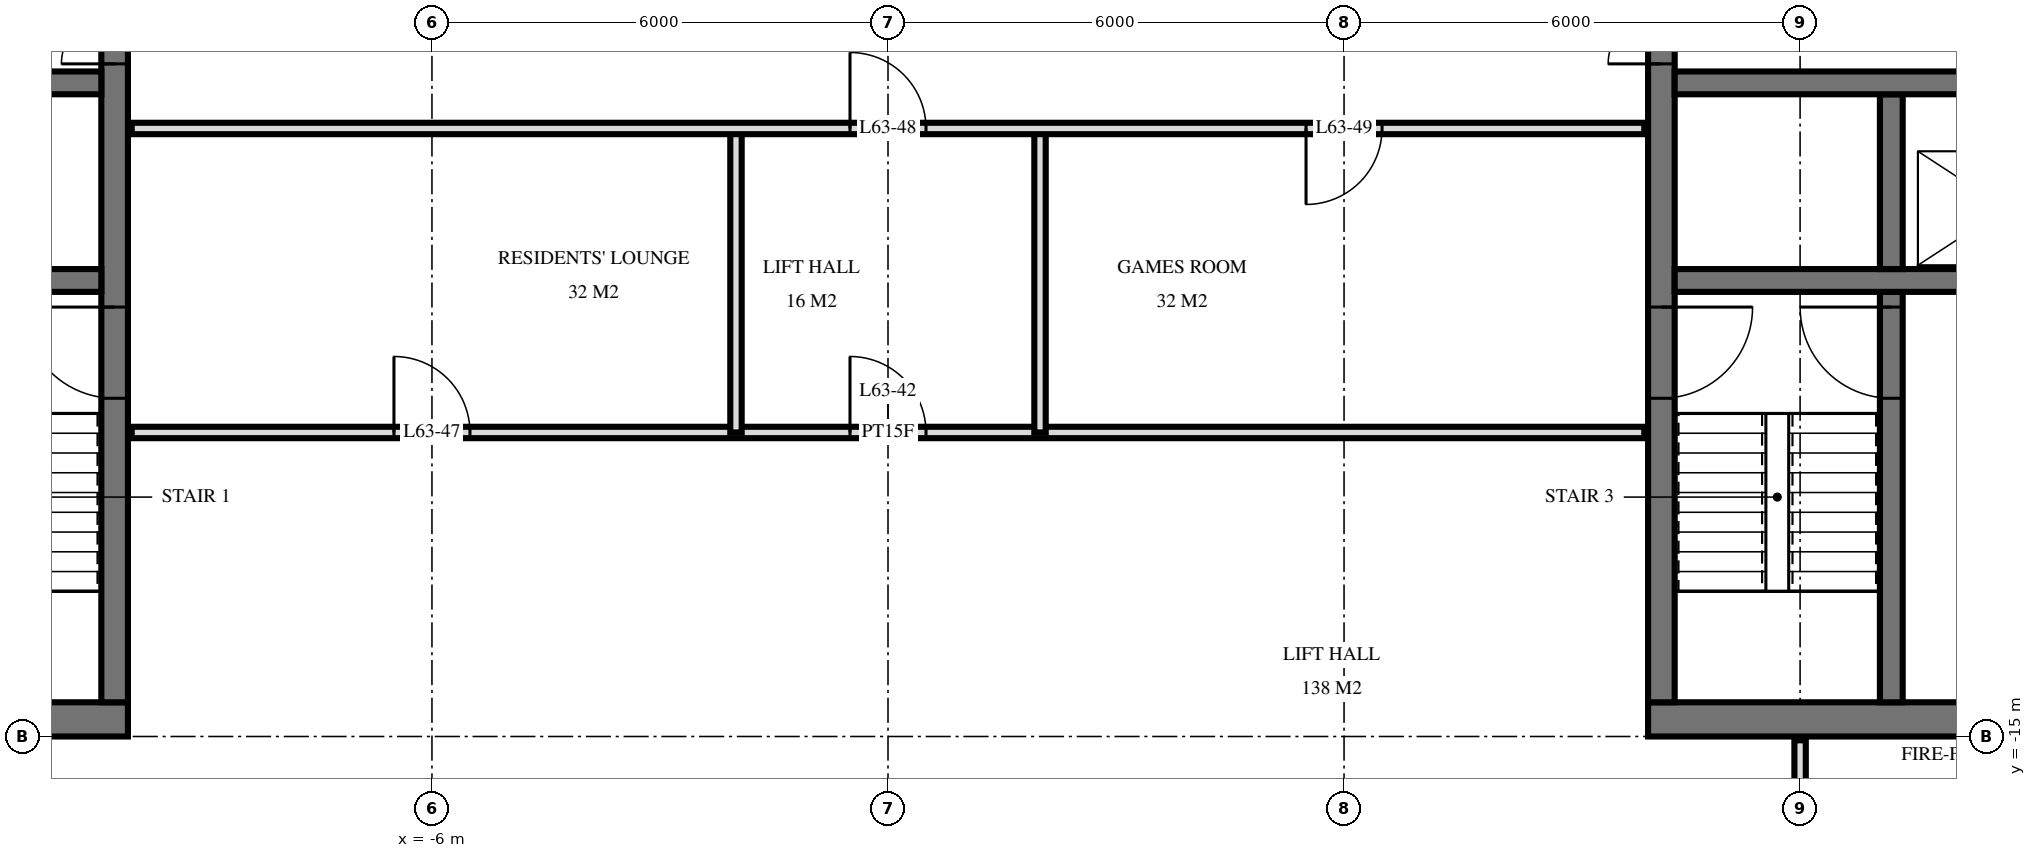
"""IFC4 building model, lengths in metres.
Left out: names, types, materials, properties, quantities, classifications, styles, units other than length and angle.
Written with IfcOpenShell. Run it as: python <this file> out.ifc"""

import sys

from ifc_helpers import new_model, si_unit, direction, frame, frame_2d, origin, place, context, subcontext, project, spatial, rectangle, extrude, element, fill, save


model = new_model("IFC4")
c1 = context("Model", 3, precision=1e-05, world=origin(), true_north=direction((0.0, 1.0)))
c2 = subcontext(c1, "Body", "Model", "MODEL_VIEW")
j1 = project(units=[si_unit("LENGTHUNIT", "METRE"), si_unit("PLANEANGLEUNIT", "RADIAN")], contexts=[c1])
p1 = place(None, origin())
s1 = spatial("IfcSite", under=j1, at=p1, CompositionType="ELEMENT")
p2 = place(p1, origin())
s2 = spatial("IfcBuilding", under=s1, at=p2, CompositionType="ELEMENT")
p3 = place(p2, frame((0.0, 0.0, 239.6)))
s3 = spatial("IfcBuildingStorey", under=s2, at=p3, CompositionType="ELEMENT", Elevation=239.6)
p4 = place(p3, frame((-24.5, -14.775, 0.0), z_axis=(0.0, 0.0, 1.0), x_axis=(1.0, 0.0, 0.0)))
e1 = element("IfcWall", 1, at=p4, inside=s3, PredefinedType="SHEAR", context=c2, shape_type="SweptSolid", body=[
    extrude(rectangle(XDim=14.5, YDim=0.45, at=frame_2d((7.25, 0.0))), origin(), (0.0, 0.0, 1.0), 3.5),
])
p5 = place(p4, frame((6.2, 0.0, 0.0)))
e2 = element("IfcOpeningElement", 2, at=p5, cuts=e1, PredefinedType="OPENING", context=c2, shape_type="SweptSolid", body=[
    extrude(rectangle(XDim=1.2, YDim=2.1, at=frame_2d((0.6, 1.05))), frame((0.0, 0.235, 0.0), z_axis=(0.0, -1.0, 0.0), x_axis=(1.0, 0.0, 0.0)), (0.0, 0.0, 1.0), 0.47),
])
p6 = place(p4, frame((9.25, 0.0, 0.0)))
e3 = element("IfcOpeningElement", 3, at=p6, cuts=e1, PredefinedType="OPENING", context=c2, shape_type="SweptSolid", body=[
    extrude(rectangle(XDim=1.1, YDim=2.1, at=frame_2d((0.55, 1.05))), frame((0.0, 0.235, 0.0), z_axis=(0.0, -1.0, 0.0), x_axis=(1.0, 0.0, 0.0)), (0.0, 0.0, 1.0), 0.47),
])
p7 = place(p4, frame((3.5, 0.0, 0.0)))
e4 = element("IfcOpeningElement", 4, at=p7, cuts=e1, PredefinedType="OPENING", context=c2, shape_type="SweptSolid", body=[
    extrude(rectangle(XDim=0.9, YDim=2.1, at=frame_2d((0.45, 1.05))), frame((0.0, 0.235, 0.0), z_axis=(0.0, -1.0, 0.0), x_axis=(1.0, 0.0, 0.0)), (0.0, 0.0, 1.0), 0.47),
])
p8 = place(p4, frame((1.05, 0.0, 0.0)))
e5 = element("IfcOpeningElement", 5, at=p8, cuts=e1, PredefinedType="OPENING", context=c2, shape_type="SweptSolid", body=[
    extrude(rectangle(XDim=1.0, YDim=2.1, at=frame_2d((0.5, 1.05))), frame((0.0, 0.235, 0.0), z_axis=(0.0, -1.0, 0.0), x_axis=(1.0, 0.0, 0.0)), (0.0, 0.0, 1.0), 0.47),
])
p9 = place(p3, frame((-10.175, -14.55, 0.0), z_axis=(0.0, 0.0, 1.0), x_axis=(0.0, 1.0, 0.0)))
e6 = element("IfcWall", 6, at=p9, inside=s3, PredefinedType="SHEAR", context=c2, shape_type="SweptSolid", body=[
    extrude(rectangle(XDim=14.1, YDim=0.35, at=frame_2d((7.05, 0.0))), origin(), (0.0, 0.0, 1.0), 3.5),
])
p10 = place(p9, frame((8.4, 0.0, 0.0)))
e7 = element("IfcOpeningElement", 7, at=p10, cuts=e6, PredefinedType="OPENING", context=c2, shape_type="SweptSolid", body=[
    extrude(rectangle(XDim=1.4, YDim=2.4, at=frame_2d((0.7, 1.2))), frame((0.0, 0.185, 0.0), z_axis=(0.0, -1.0, 0.0), x_axis=(1.0, 0.0, 0.0)), (0.0, 0.0, 1.0), 0.37),
])
p11 = place(p9, frame((10.0, 0.0, 0.0)))
e8 = element("IfcOpeningElement", 8, at=p11, cuts=e6, PredefinedType="OPENING", context=c2, shape_type="SweptSolid", body=[
    extrude(rectangle(XDim=1.4, YDim=2.4, at=frame_2d((0.7, 1.2))), frame((0.0, 0.185, 0.0), z_axis=(0.0, -1.0, 0.0), x_axis=(1.0, 0.0, 0.0)), (0.0, 0.0, 1.0), 0.37),
])
p12 = place(p9, frame((4.0, 0.0, 0.0)))
e9 = element("IfcOpeningElement", 9, at=p12, cuts=e6, PredefinedType="OPENING", context=c2, shape_type="SweptSolid", body=[
    extrude(rectangle(XDim=1.2, YDim=2.1, at=frame_2d((0.6, 1.05))), frame((0.0, 0.185, 0.0), z_axis=(0.0, -1.0, 0.0), x_axis=(1.0, 0.0, 0.0)), (0.0, 0.0, 1.0), 0.37),
])
p13 = place(p3, frame((-24.05, -6.4, 0.0), z_axis=(0.0, 0.0, 1.0), x_axis=(1.0, 0.0, 0.0)))
e10 = element("IfcWall", 10, at=p13, inside=s3, PredefinedType="SHEAR", context=c2, shape_type="SweptSolid", body=[
    extrude(rectangle(XDim=13.7, YDim=0.3, at=frame_2d((6.85, 0.0))), origin(), (0.0, 0.0, 1.0), 3.5),
])
p14 = place(p13, frame((0.55, 0.0, 0.0)))
e11 = element("IfcOpeningElement", 11, at=p14, cuts=e10, PredefinedType="OPENING", context=c2, shape_type="SweptSolid", body=[
    extrude(rectangle(XDim=1.1, YDim=2.1, at=frame_2d((0.55, 1.05))), frame((0.0, 0.16, 0.0), z_axis=(0.0, -1.0, 0.0), x_axis=(1.0, 0.0, 0.0)), (0.0, 0.0, 1.0), 0.32),
])
p15 = place(p13, frame((5.8, 0.0, 0.0)))
e12 = element("IfcOpeningElement", 12, at=p15, cuts=e10, PredefinedType="OPENING", context=c2, shape_type="SweptSolid", body=[
    extrude(rectangle(XDim=1.1, YDim=2.1, at=frame_2d((0.55, 1.05))), frame((0.0, 0.16, 0.0), z_axis=(0.0, -1.0, 0.0), x_axis=(1.0, 0.0, 0.0)), (0.0, 0.0, 1.0), 0.32),
])
p16 = place(p3, frame((-24.05, -9.0, 0.0), z_axis=(0.0, 0.0, 1.0), x_axis=(1.0, 0.0, 0.0)))
e13 = element("IfcWall", 13, at=p16, inside=s3, PredefinedType="SHEAR", context=c2, shape_type="SweptSolid", body=[
    extrude(rectangle(XDim=13.7, YDim=0.3, at=frame_2d((6.85, 0.0))), origin(), (0.0, 0.0, 1.0), 3.5),
])
p17 = place(p16, frame((8.8, 0.0, 0.0)))
e14 = element("IfcOpeningElement", 14, at=p17, cuts=e13, PredefinedType="OPENING", context=c2, shape_type="SweptSolid", body=[
    extrude(rectangle(XDim=1.1, YDim=2.1, at=frame_2d((0.55, 1.05))), frame((0.0, 0.16, 0.0), z_axis=(0.0, -1.0, 0.0), x_axis=(1.0, 0.0, 0.0)), (0.0, 0.0, 1.0), 0.32),
])
p18 = place(p3, frame((10.0, -14.775, 0.0), z_axis=(0.0, 0.0, 1.0), x_axis=(1.0, 0.0, 0.0)))
e15 = element("IfcWall", 15, at=p18, inside=s3, PredefinedType="SHEAR", context=c2, shape_type="SweptSolid", body=[
    extrude(rectangle(XDim=14.5, YDim=0.45, at=frame_2d((7.25, 0.0))), origin(), (0.0, 0.0, 1.0), 3.5),
])
p19 = place(p18, frame((7.1, 0.0, 0.0)))
e16 = element("IfcOpeningElement", 16, at=p19, cuts=e15, PredefinedType="OPENING", context=c2, shape_type="SweptSolid", body=[
    extrude(rectangle(XDim=1.2, YDim=2.1, at=frame_2d((0.6, 1.05))), frame((0.0, 0.235, 0.0), z_axis=(0.0, -1.0, 0.0), x_axis=(1.0, 0.0, 0.0)), (0.0, 0.0, 1.0), 0.47),
])
p20 = place(p18, frame((4.15, 0.0, 0.0)))
e17 = element("IfcOpeningElement", 17, at=p20, cuts=e15, PredefinedType="OPENING", context=c2, shape_type="SweptSolid", body=[
    extrude(rectangle(XDim=1.1, YDim=2.1, at=frame_2d((0.55, 1.05))), frame((0.0, 0.235, 0.0), z_axis=(0.0, -1.0, 0.0), x_axis=(1.0, 0.0, 0.0)), (0.0, 0.0, 1.0), 0.47),
])
p21 = place(p18, frame((10.1, 0.0, 0.0)))
e18 = element("IfcOpeningElement", 18, at=p21, cuts=e15, PredefinedType="OPENING", context=c2, shape_type="SweptSolid", body=[
    extrude(rectangle(XDim=0.9, YDim=2.1, at=frame_2d((0.45, 1.05))), frame((0.0, 0.235, 0.0), z_axis=(0.0, -1.0, 0.0), x_axis=(1.0, 0.0, 0.0)), (0.0, 0.0, 1.0), 0.47),
])
p22 = place(p18, frame((12.45, 0.0, 0.0)))
e19 = element("IfcOpeningElement", 19, at=p22, cuts=e15, PredefinedType="OPENING", context=c2, shape_type="SweptSolid", body=[
    extrude(rectangle(XDim=1.0, YDim=2.1, at=frame_2d((0.5, 1.05))), frame((0.0, 0.235, 0.0), z_axis=(0.0, -1.0, 0.0), x_axis=(1.0, 0.0, 0.0)), (0.0, 0.0, 1.0), 0.47),
])
p23 = place(p3, frame((10.175, -14.55, 0.0), z_axis=(0.0, 0.0, 1.0), x_axis=(0.0, 1.0, 0.0)))
e20 = element("IfcWall", 20, at=p23, inside=s3, PredefinedType="SHEAR", context=c2, shape_type="SweptSolid", body=[
    extrude(rectangle(XDim=14.1, YDim=0.35, at=frame_2d((7.05, 0.0))), origin(), (0.0, 0.0, 1.0), 3.5),
])
p24 = place(p23, frame((8.4, 0.0, 0.0)))
e21 = element("IfcOpeningElement", 21, at=p24, cuts=e20, PredefinedType="OPENING", context=c2, shape_type="SweptSolid", body=[
    extrude(rectangle(XDim=1.4, YDim=2.4, at=frame_2d((0.7, 1.2))), frame((0.0, 0.185, 0.0), z_axis=(0.0, -1.0, 0.0), x_axis=(1.0, 0.0, 0.0)), (0.0, 0.0, 1.0), 0.37),
])
p25 = place(p23, frame((10.0, 0.0, 0.0)))
e22 = element("IfcOpeningElement", 22, at=p25, cuts=e20, PredefinedType="OPENING", context=c2, shape_type="SweptSolid", body=[
    extrude(rectangle(XDim=1.4, YDim=2.4, at=frame_2d((0.7, 1.2))), frame((0.0, 0.185, 0.0), z_axis=(0.0, -1.0, 0.0), x_axis=(1.0, 0.0, 0.0)), (0.0, 0.0, 1.0), 0.37),
])
p26 = place(p23, frame((4.0, 0.0, 0.0)))
e23 = element("IfcOpeningElement", 23, at=p26, cuts=e20, PredefinedType="OPENING", context=c2, shape_type="SweptSolid", body=[
    extrude(rectangle(XDim=1.2, YDim=2.1, at=frame_2d((0.6, 1.05))), frame((0.0, 0.185, 0.0), z_axis=(0.0, -1.0, 0.0), x_axis=(1.0, 0.0, 0.0)), (0.0, 0.0, 1.0), 0.37),
])
p27 = place(p3, frame((10.35, -6.4, 0.0), z_axis=(0.0, 0.0, 1.0), x_axis=(1.0, 0.0, 0.0)))
e24 = element("IfcWall", 24, at=p27, inside=s3, PredefinedType="SHEAR", context=c2, shape_type="SweptSolid", body=[
    extrude(rectangle(XDim=13.7, YDim=0.3, at=frame_2d((6.85, 0.0))), origin(), (0.0, 0.0, 1.0), 3.5),
])
p28 = place(p27, frame((12.05, 0.0, 0.0)))
e25 = element("IfcOpeningElement", 25, at=p28, cuts=e24, PredefinedType="OPENING", context=c2, shape_type="SweptSolid", body=[
    extrude(rectangle(XDim=1.1, YDim=2.1, at=frame_2d((0.55, 1.05))), frame((0.0, 0.16, 0.0), z_axis=(0.0, -1.0, 0.0), x_axis=(1.0, 0.0, 0.0)), (0.0, 0.0, 1.0), 0.32),
])
p29 = place(p27, frame((6.8, 0.0, 0.0)))
e26 = element("IfcOpeningElement", 26, at=p29, cuts=e24, PredefinedType="OPENING", context=c2, shape_type="SweptSolid", body=[
    extrude(rectangle(XDim=1.1, YDim=2.1, at=frame_2d((0.55, 1.05))), frame((0.0, 0.16, 0.0), z_axis=(0.0, -1.0, 0.0), x_axis=(1.0, 0.0, 0.0)), (0.0, 0.0, 1.0), 0.32),
])
p30 = place(p3, frame((10.35, -9.0, 0.0), z_axis=(0.0, 0.0, 1.0), x_axis=(1.0, 0.0, 0.0)))
e27 = element("IfcWall", 27, at=p30, inside=s3, PredefinedType="SHEAR", context=c2, shape_type="SweptSolid", body=[
    extrude(rectangle(XDim=13.7, YDim=0.3, at=frame_2d((6.85, 0.0))), origin(), (0.0, 0.0, 1.0), 3.5),
])
p31 = place(p30, frame((3.8, 0.0, 0.0)))
e28 = element("IfcOpeningElement", 28, at=p31, cuts=e27, PredefinedType="OPENING", context=c2, shape_type="SweptSolid", body=[
    extrude(rectangle(XDim=1.1, YDim=2.1, at=frame_2d((0.55, 1.05))), frame((0.0, 0.16, 0.0), z_axis=(0.0, -1.0, 0.0), x_axis=(1.0, 0.0, 0.0)), (0.0, 0.0, 1.0), 0.32),
])
p32 = place(p3, frame((13.2, -8.85, 0.0), z_axis=(0.0, 0.0, 1.0), x_axis=(0.0, 1.0, 0.0)))
e29 = element("IfcWall", 29, at=p32, inside=s3, PredefinedType="SHEAR", context=c2, shape_type="SweptSolid", body=[
    extrude(rectangle(XDim=2.3, YDim=0.3, at=frame_2d((1.15, 0.0))), origin(), (0.0, 0.0, 1.0), 3.5),
])
p33 = place(p3, frame((13.2, -14.55, 0.0), z_axis=(0.0, 0.0, 1.0), x_axis=(0.0, 1.0, 0.0)))
e30 = element("IfcWall", 30, at=p33, inside=s3, PredefinedType="SHEAR", context=c2, shape_type="SweptSolid", body=[
    extrude(rectangle(XDim=5.4, YDim=0.3, at=frame_2d((2.7, 0.0))), origin(), (0.0, 0.0, 1.0), 3.5),
])
p34 = place(p33, frame((4.0, 0.0, 0.0)))
e31 = element("IfcOpeningElement", 31, at=p34, cuts=e30, PredefinedType="OPENING", context=c2, shape_type="SweptSolid", body=[
    extrude(rectangle(XDim=1.2, YDim=2.1, at=frame_2d((0.6, 1.05))), frame((0.0, 0.16, 0.0), z_axis=(0.0, -1.0, 0.0), x_axis=(1.0, 0.0, 0.0)), (0.0, 0.0, 1.0), 0.32),
])
p35 = place(p3, frame((12.0, -17.4, 0.0), z_axis=(0.0, 0.0, 1.0), x_axis=(0.0, 1.0, 0.0)))
e32 = element("IfcWall", 32, at=p35, inside=s3, PredefinedType="PARTITIONING", context=c2, shape_type="SweptSolid", body=[
    extrude(rectangle(XDim=2.35, YDim=0.15, at=frame_2d((1.175, 0.0))), origin(), (0.0, 0.0, 1.0), 3.22),
])
p36 = place(p35, frame((0.7, 0.0, 0.0)))
e33 = element("IfcOpeningElement", 33, at=p36, cuts=e32, PredefinedType="OPENING", context=c2, shape_type="SweptSolid", body=[
    extrude(rectangle(XDim=1.0, YDim=2.1, at=frame_2d((0.5, 1.05))), frame((0.0, 0.085, 0.0), z_axis=(0.0, -1.0, 0.0), x_axis=(1.0, 0.0, 0.0)), (0.0, 0.0, 1.0), 0.17),
])
for number, where, z_axis, x_axis in (
    (34, (2.0, -11.0, 0.0), (0.0, 0.0, 1.0), (0.0, 1.0, 0.0)),
    (35, (-2.0, -11.0, 0.0), (0.0, 0.0, 1.0), (0.0, 1.0, 0.0)),
):
    element("IfcWall", number, at=place(p3, frame(where, z_axis=z_axis, x_axis=x_axis)), inside=s3, PredefinedType="PARTITIONING", context=c2, shape_type="SweptSolid", body=[
        extrude(rectangle(XDim=4.0, YDim=0.15, at=frame_2d((2.0, 0.0))), origin(), (0.0, 0.0, 1.0), 3.22),
    ])
p37 = place(p3, frame((-9.95, -11.0, 0.0), z_axis=(0.0, 0.0, 1.0), x_axis=(1.0, 0.0, 0.0)))
e36 = element("IfcWall", 36, at=p37, inside=s3, PredefinedType="PARTITIONING", context=c2, shape_type="SweptSolid", body=[
    extrude(rectangle(XDim=19.9, YDim=0.15, at=frame_2d((9.95, 0.0))), origin(), (0.0, 0.0, 1.0), 3.22),
])
p38 = place(p37, frame((9.45, 0.0, 0.0)))
e37 = element("IfcOpeningElement", 37, at=p38, cuts=e36, PredefinedType="OPENING", context=c2, shape_type="SweptSolid", body=[
    extrude(rectangle(XDim=1.0, YDim=2.1, at=frame_2d((0.5, 1.05))), frame((0.0, 0.085, 0.0), z_axis=(0.0, -1.0, 0.0), x_axis=(1.0, 0.0, 0.0)), (0.0, 0.0, 1.0), 0.17),
])
p39 = place(p37, frame((3.45, 0.0, 0.0)))
e38 = element("IfcOpeningElement", 38, at=p39, cuts=e36, PredefinedType="OPENING", context=c2, shape_type="SweptSolid", body=[
    extrude(rectangle(XDim=1.0, YDim=2.1, at=frame_2d((0.5, 1.05))), frame((0.0, 0.085, 0.0), z_axis=(0.0, -1.0, 0.0), x_axis=(1.0, 0.0, 0.0)), (0.0, 0.0, 1.0), 0.17),
])
p40 = place(p3, frame((-9.95, -7.0, 0.0), z_axis=(0.0, 0.0, 1.0), x_axis=(1.0, 0.0, 0.0)))
e39 = element("IfcWall", 39, at=p40, inside=s3, PredefinedType="PARTITIONING", context=c2, shape_type="SweptSolid", body=[
    extrude(rectangle(XDim=19.9, YDim=0.15, at=frame_2d((9.95, 0.0))), origin(), (0.0, 0.0, 1.0), 3.22),
])
p41 = place(p40, frame((9.45, 0.0, 0.0)))
e40 = element("IfcOpeningElement", 40, at=p41, cuts=e39, PredefinedType="OPENING", context=c2, shape_type="SweptSolid", body=[
    extrude(rectangle(XDim=1.0, YDim=2.1, at=frame_2d((0.5, 1.05))), frame((0.0, 0.085, 0.0), z_axis=(0.0, -1.0, 0.0), x_axis=(1.0, 0.0, 0.0)), (0.0, 0.0, 1.0), 0.17),
])
p42 = place(p40, frame((15.45, 0.0, 0.0)))
e41 = element("IfcOpeningElement", 41, at=p42, cuts=e39, PredefinedType="OPENING", context=c2, shape_type="SweptSolid", body=[
    extrude(rectangle(XDim=1.0, YDim=2.1, at=frame_2d((0.5, 1.05))), frame((0.0, 0.085, 0.0), z_axis=(0.0, -1.0, 0.0), x_axis=(1.0, 0.0, 0.0)), (0.0, 0.0, 1.0), 0.17),
])
p43 = place(p10, origin())
e42 = element("IfcDoor", 42, at=p43, inside=s3, OperationType="DOUBLE_DOOR_SINGLE_SWING", PredefinedType="DOOR", context=c2, shape_type="SweptSolid", body=[
    extrude(rectangle(XDim=1.4, YDim=2.4, at=frame_2d((0.7, 1.2))), frame((0.0, 0.025, 0.0), z_axis=(0.0, -1.0, 0.0), x_axis=(1.0, 0.0, 0.0)), (0.0, 0.0, 1.0), 0.05),
])
fill(e7, e42)
p44 = place(p12, origin())
e43 = element("IfcDoor", 43, at=p44, inside=s3, OperationType="SINGLE_SWING_LEFT", PredefinedType="DOOR", context=c2, shape_type="SweptSolid", body=[
    extrude(rectangle(XDim=1.2, YDim=2.1, at=frame_2d((0.6, 1.05))), frame((0.0, 0.025, 0.0), z_axis=(0.0, -1.0, 0.0), x_axis=(1.0, 0.0, 0.0)), (0.0, 0.0, 1.0), 0.05),
])
fill(e9, e43)
p45 = place(p24, origin())
e44 = element("IfcDoor", 44, at=p45, inside=s3, OperationType="DOUBLE_DOOR_SINGLE_SWING", PredefinedType="DOOR", context=c2, shape_type="SweptSolid", body=[
    extrude(rectangle(XDim=1.4, YDim=2.4, at=frame_2d((0.7, 1.2))), frame((0.0, 0.025, 0.0), z_axis=(0.0, -1.0, 0.0), x_axis=(1.0, 0.0, 0.0)), (0.0, 0.0, 1.0), 0.05),
])
fill(e21, e44)
p46 = place(p26, frame((0.6, 0.0, 0.0), z_axis=(0.0, 0.0, 1.0), x_axis=(-1.0, 0.0, 0.0)))
e45 = element("IfcDoor", 45, at=p46, inside=s3, OperationType="SINGLE_SWING_RIGHT", PredefinedType="DOOR", context=c2, shape_type="SweptSolid", body=[
    extrude(rectangle(XDim=1.2, YDim=2.1, at=frame_2d((0.0, 1.05))), frame((0.0, -0.025, 0.0), z_axis=(0.0, 1.0, 0.0), x_axis=(-1.0, 0.0, 0.0)), (0.0, 0.0, 1.0), 0.05),
])
fill(e23, e45)
p47 = place(p34, origin())
e46 = element("IfcDoor", 46, at=p47, inside=s3, OperationType="SINGLE_SWING_LEFT", PredefinedType="DOOR", context=c2, shape_type="SweptSolid", body=[
    extrude(rectangle(XDim=1.2, YDim=2.1, at=frame_2d((0.6, 1.05))), frame((0.0, 0.025, 0.0), z_axis=(0.0, -1.0, 0.0), x_axis=(1.0, 0.0, 0.0)), (0.0, 0.0, 1.0), 0.05),
])
fill(e31, e46)
p48 = place(p38, origin())
e47 = element("IfcDoor", 47, at=p48, inside=s3, OperationType="SINGLE_SWING_RIGHT", PredefinedType="DOOR", context=c2, shape_type="SweptSolid", body=[
    extrude(rectangle(XDim=1.0, YDim=2.1, at=frame_2d((0.5, 1.05))), frame((0.0, 0.025, 0.0), z_axis=(0.0, -1.0, 0.0), x_axis=(1.0, 0.0, 0.0)), (0.0, 0.0, 1.0), 0.05),
])
fill(e37, e47)
p49 = place(p39, origin())
e48 = element("IfcDoor", 48, at=p49, inside=s3, OperationType="SINGLE_SWING_RIGHT", PredefinedType="DOOR", context=c2, shape_type="SweptSolid", body=[
    extrude(rectangle(XDim=1.0, YDim=2.1, at=frame_2d((0.5, 1.05))), frame((0.0, 0.025, 0.0), z_axis=(0.0, -1.0, 0.0), x_axis=(1.0, 0.0, 0.0)), (0.0, 0.0, 1.0), 0.05),
])
fill(e38, e48)
p50 = place(p41, origin())
e49 = element("IfcDoor", 49, at=p50, inside=s3, OperationType="SINGLE_SWING_RIGHT", PredefinedType="DOOR", context=c2, shape_type="SweptSolid", body=[
    extrude(rectangle(XDim=1.0, YDim=2.1, at=frame_2d((0.5, 1.05))), frame((0.0, 0.025, 0.0), z_axis=(0.0, -1.0, 0.0), x_axis=(1.0, 0.0, 0.0)), (0.0, 0.0, 1.0), 0.05),
])
fill(e40, e49)
p51 = place(p42, frame((0.5, 0.0, 0.0), z_axis=(0.0, 0.0, 1.0), x_axis=(-1.0, 0.0, 0.0)))
e50 = element("IfcDoor", 50, at=p51, inside=s3, OperationType="SINGLE_SWING_LEFT", PredefinedType="DOOR", context=c2, shape_type="SweptSolid", body=[
    extrude(rectangle(XDim=1.0, YDim=2.1, at=frame_2d((0.0, 1.05))), frame((0.0, -0.025, 0.0), z_axis=(0.0, 1.0, 0.0), x_axis=(-1.0, 0.0, 0.0)), (0.0, 0.0, 1.0), 0.05),
])
fill(e41, e50)
save(model, sys.argv[1])
